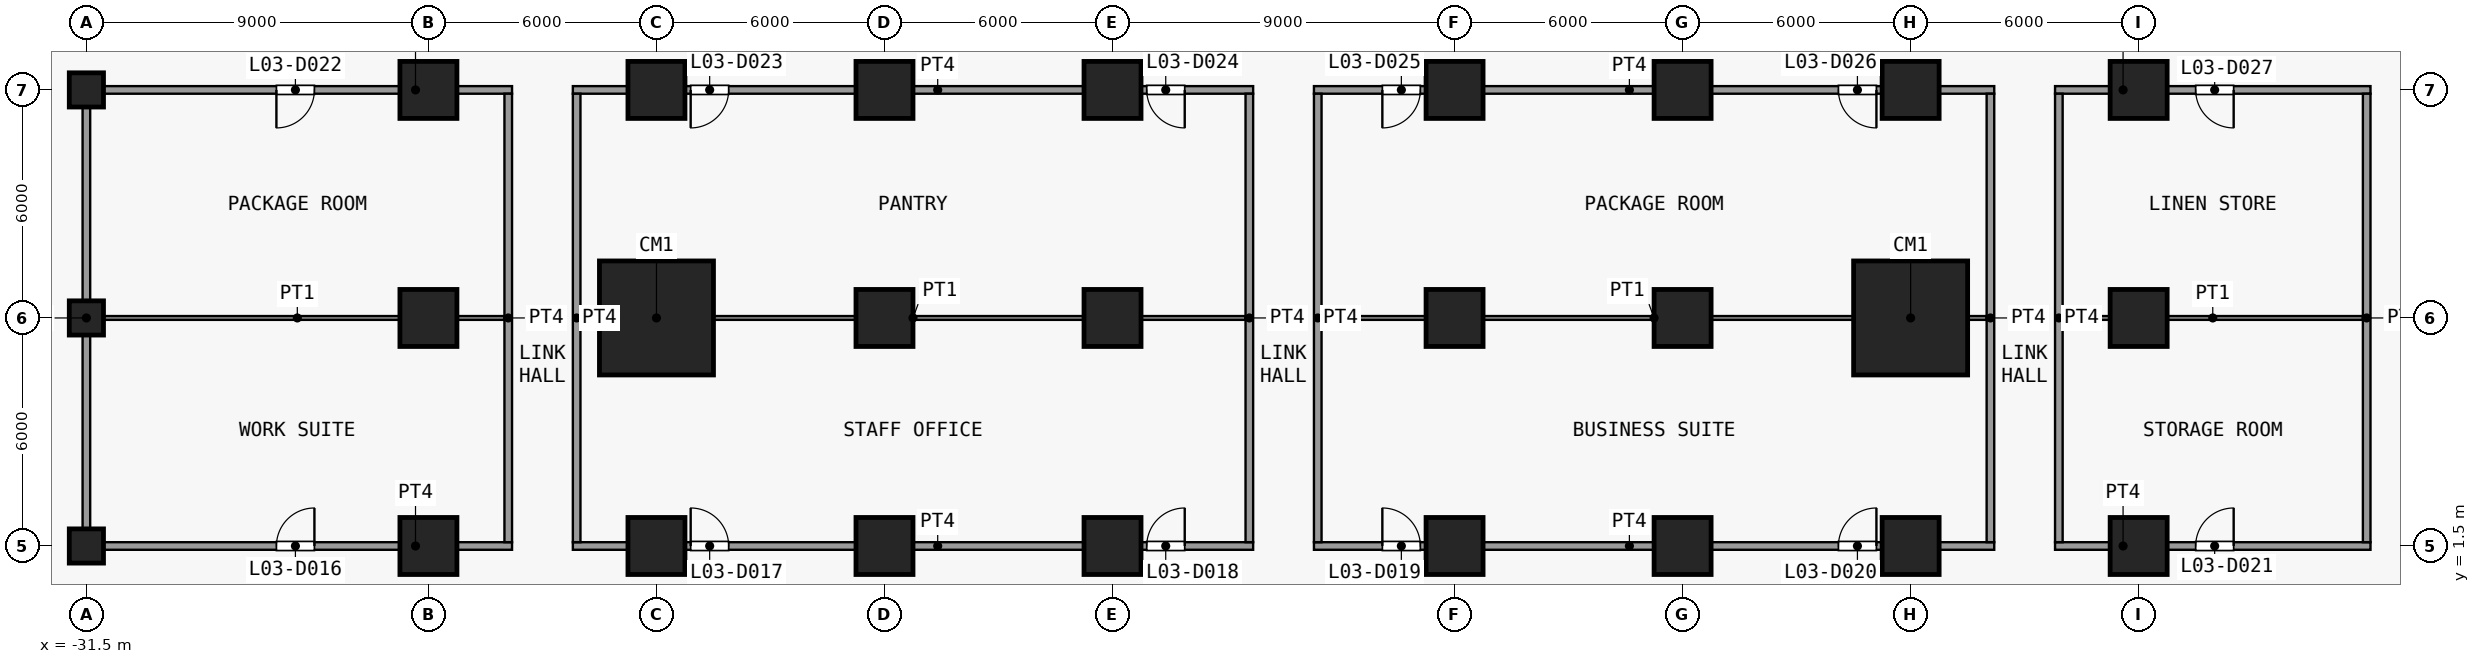
"""IFC4 building model, lengths in metres.
Left out: names, types, materials, properties, quantities, classifications, styles, units other than length and angle.
Written with IfcOpenShell. Run it as: python <this file> out.ifc"""

import sys

from ifc_helpers import new_model, si_unit, direction, frame, frame_2d, origin, origin_2d, place, context, subcontext, project, spatial, rectangle, extrude, element, fill, save


model = new_model("IFC4")
c1 = context("Model", 3, precision=1e-05, world=origin(), true_north=direction((0.0, 1.0)))
c2 = subcontext(c1, "Body", "Model", "MODEL_VIEW")
j1 = project(units=[si_unit("LENGTHUNIT", "METRE"), si_unit("PLANEANGLEUNIT", "RADIAN")], contexts=[c1])
p1 = place(None, origin())
s1 = spatial("IfcSite", under=j1, at=p1, CompositionType="ELEMENT")
p2 = place(p1, origin())
s2 = spatial("IfcBuilding", under=s1, at=p2, CompositionType="ELEMENT")
p3 = place(p2, frame((0.0, 0.0, 18.5)))
s3 = spatial("IfcBuildingStorey", under=s2, at=p3, CompositionType="ELEMENT", Elevation=18.5)
for number, where, z_axis, x_axis in (
    (1, (-31.5, 1.5, 0.0), (0.0, 0.0, 1.0), (1.0, 0.0, 0.0)),
    (2, (-31.5, 7.5, 0.0), (0.0, 0.0, 1.0), (1.0, 0.0, 0.0)),
    (3, (-31.5, 13.5, 0.0), (0.0, 0.0, 1.0), (1.0, 0.0, 0.0)),
):
    element("IfcColumn", number, at=place(p3, frame(where, z_axis=z_axis, x_axis=x_axis)), inside=s3, PredefinedType="COLUMN", context=c2, shape_type="SweptSolid", body=[
        extrude(rectangle(XDim=0.9, YDim=0.9, at=origin_2d()), origin(), (0.0, 0.0, 1.0), 5.0),
    ])
for number, where, z_axis, x_axis in (
    (4, (-22.5, 1.5, 0.0), (0.0, 0.0, 1.0), (1.0, 0.0, 0.0)),
    (5, (-22.5, 7.5, 0.0), (0.0, 0.0, 1.0), (1.0, 0.0, 0.0)),
    (6, (-22.5, 13.5, 0.0), (0.0, 0.0, 1.0), (1.0, 0.0, 0.0)),
    (7, (-16.5, 1.5, 0.0), (0.0, 0.0, 1.0), (1.0, 0.0, 0.0)),
):
    element("IfcColumn", number, at=place(p3, frame(where, z_axis=z_axis, x_axis=x_axis)), inside=s3, PredefinedType="COLUMN", context=c2, shape_type="SweptSolid", body=[
        extrude(rectangle(XDim=1.5, YDim=1.5, at=origin_2d()), origin(), (0.0, 0.0, 1.0), 5.0),
    ])
p4 = place(p3, frame((-16.5, 7.5, 0.0), z_axis=(0.0, 0.0, 1.0), x_axis=(1.0, 0.0, 0.0)))
e8 = element("IfcColumn", 8, at=p4, inside=s3, PredefinedType="COLUMN", context=c2, shape_type="SweptSolid", body=[
    extrude(rectangle(XDim=3.0, YDim=3.0, at=origin_2d()), origin(), (0.0, 0.0, 1.0), 5.0),
])
for number, where, z_axis, x_axis in (
    (9, (-16.5, 13.5, 0.0), (0.0, 0.0, 1.0), (1.0, 0.0, 0.0)),
    (10, (-10.5, 1.5, 0.0), (0.0, 0.0, 1.0), (1.0, 0.0, 0.0)),
    (11, (-10.5, 7.5, 0.0), (0.0, 0.0, 1.0), (1.0, 0.0, 0.0)),
    (12, (-10.5, 13.5, 0.0), (0.0, 0.0, 1.0), (1.0, 0.0, 0.0)),
    (13, (-4.5, 1.5, 0.0), (0.0, 0.0, 1.0), (1.0, 0.0, 0.0)),
    (14, (-4.5, 7.5, 0.0), (0.0, 0.0, 1.0), (1.0, 0.0, 0.0)),
    (15, (-4.5, 13.5, 0.0), (0.0, 0.0, 1.0), (1.0, 0.0, 0.0)),
    (16, (4.5, 1.5, 0.0), (0.0, 0.0, 1.0), (1.0, 0.0, 0.0)),
    (17, (4.5, 7.5, 0.0), (0.0, 0.0, 1.0), (1.0, 0.0, 0.0)),
    (18, (4.5, 13.5, 0.0), (0.0, 0.0, 1.0), (1.0, 0.0, 0.0)),
    (19, (10.5, 1.5, 0.0), (0.0, 0.0, 1.0), (1.0, 0.0, 0.0)),
    (20, (10.5, 7.5, 0.0), (0.0, 0.0, 1.0), (1.0, 0.0, 0.0)),
    (21, (10.5, 13.5, 0.0), (0.0, 0.0, 1.0), (1.0, 0.0, 0.0)),
    (22, (16.5, 1.5, 0.0), (0.0, 0.0, 1.0), (1.0, 0.0, 0.0)),
):
    element("IfcColumn", number, at=place(p3, frame(where, z_axis=z_axis, x_axis=x_axis)), inside=s3, PredefinedType="COLUMN", context=c2, shape_type="SweptSolid", body=[
        extrude(rectangle(XDim=1.5, YDim=1.5, at=origin_2d()), origin(), (0.0, 0.0, 1.0), 5.0),
    ])
p5 = place(p3, frame((16.5, 7.5, 0.0), z_axis=(0.0, 0.0, 1.0), x_axis=(1.0, 0.0, 0.0)))
e23 = element("IfcColumn", 23, at=p5, inside=s3, PredefinedType="COLUMN", context=c2, shape_type="SweptSolid", body=[
    extrude(rectangle(XDim=3.0, YDim=3.0, at=origin_2d()), origin(), (0.0, 0.0, 1.0), 5.0),
])
for number, where, z_axis, x_axis in (
    (24, (16.5, 13.5, 0.0), (0.0, 0.0, 1.0), (1.0, 0.0, 0.0)),
    (25, (22.5, 1.5, 0.0), (0.0, 0.0, 1.0), (1.0, 0.0, 0.0)),
    (26, (22.5, 7.5, 0.0), (0.0, 0.0, 1.0), (1.0, 0.0, 0.0)),
    (27, (22.5, 13.5, 0.0), (0.0, 0.0, 1.0), (1.0, 0.0, 0.0)),
):
    element("IfcColumn", number, at=place(p3, frame(where, z_axis=z_axis, x_axis=x_axis)), inside=s3, PredefinedType="COLUMN", context=c2, shape_type="SweptSolid", body=[
        extrude(rectangle(XDim=1.5, YDim=1.5, at=origin_2d()), origin(), (0.0, 0.0, 1.0), 5.0),
    ])
p6 = place(p3, frame((-31.6, 1.5, 0.0), z_axis=(0.0, 0.0, 1.0), x_axis=(1.0, 0.0, 0.0)))
e28 = element("IfcWall", 28, at=p6, inside=s3, PredefinedType="PARTITIONING", context=c2, shape_type="SweptSolid", body=[
    extrude(rectangle(XDim=11.3, YDim=0.2, at=frame_2d((5.65, 0.0))), origin(), (0.0, 0.0, 1.0), 4.65),
])
p7 = place(p6, frame((5.1, 0.0, 0.0)))
e29 = element("IfcOpeningElement", 29, at=p7, cuts=e28, PredefinedType="OPENING", context=c2, shape_type="SweptSolid", body=[
    extrude(rectangle(XDim=1.0, YDim=2.1, at=frame_2d((0.5, 1.05))), frame((0.0, 0.11, 0.0), z_axis=(0.0, -1.0, 0.0), x_axis=(1.0, 0.0, 0.0)), (0.0, 0.0, 1.0), 0.22),
])
p8 = place(p3, frame((-18.7, 1.5, 0.0), z_axis=(0.0, 0.0, 1.0), x_axis=(1.0, 0.0, 0.0)))
e30 = element("IfcWall", 30, at=p8, inside=s3, PredefinedType="PARTITIONING", context=c2, shape_type="SweptSolid", body=[
    extrude(rectangle(XDim=17.9, YDim=0.2, at=frame_2d((8.95, 0.0))), origin(), (0.0, 0.0, 1.0), 4.65),
])
p9 = place(p8, frame((3.1, 0.0, 0.0)))
e31 = element("IfcOpeningElement", 31, at=p9, cuts=e30, PredefinedType="OPENING", context=c2, shape_type="SweptSolid", body=[
    extrude(rectangle(XDim=1.0, YDim=2.1, at=frame_2d((0.5, 1.05))), frame((0.0, 0.11, 0.0), z_axis=(0.0, -1.0, 0.0), x_axis=(1.0, 0.0, 0.0)), (0.0, 0.0, 1.0), 0.22),
])
p10 = place(p8, frame((15.1, 0.0, 0.0)))
e32 = element("IfcOpeningElement", 32, at=p10, cuts=e30, PredefinedType="OPENING", context=c2, shape_type="SweptSolid", body=[
    extrude(rectangle(XDim=1.0, YDim=2.1, at=frame_2d((0.5, 1.05))), frame((0.0, 0.11, 0.0), z_axis=(0.0, -1.0, 0.0), x_axis=(1.0, 0.0, 0.0)), (0.0, 0.0, 1.0), 0.22),
])
p11 = place(p3, frame((0.8, 1.5, 0.0), z_axis=(0.0, 0.0, 1.0), x_axis=(1.0, 0.0, 0.0)))
e33 = element("IfcWall", 33, at=p11, inside=s3, PredefinedType="PARTITIONING", context=c2, shape_type="SweptSolid", body=[
    extrude(rectangle(XDim=17.9, YDim=0.2, at=frame_2d((8.95, 0.0))), origin(), (0.0, 0.0, 1.0), 4.65),
])
p12 = place(p11, frame((1.8, 0.0, 0.0)))
e34 = element("IfcOpeningElement", 34, at=p12, cuts=e33, PredefinedType="OPENING", context=c2, shape_type="SweptSolid", body=[
    extrude(rectangle(XDim=1.0, YDim=2.1, at=frame_2d((0.5, 1.05))), frame((0.0, 0.11, 0.0), z_axis=(0.0, -1.0, 0.0), x_axis=(1.0, 0.0, 0.0)), (0.0, 0.0, 1.0), 0.22),
])
p13 = place(p11, frame((13.8, 0.0, 0.0)))
e35 = element("IfcOpeningElement", 35, at=p13, cuts=e33, PredefinedType="OPENING", context=c2, shape_type="SweptSolid", body=[
    extrude(rectangle(XDim=1.0, YDim=2.1, at=frame_2d((0.5, 1.05))), frame((0.0, 0.11, 0.0), z_axis=(0.0, -1.0, 0.0), x_axis=(1.0, 0.0, 0.0)), (0.0, 0.0, 1.0), 0.22),
])
p14 = place(p3, frame((20.3, 1.5, 0.0), z_axis=(0.0, 0.0, 1.0), x_axis=(1.0, 0.0, 0.0)))
e36 = element("IfcWall", 36, at=p14, inside=s3, PredefinedType="PARTITIONING", context=c2, shape_type="SweptSolid", body=[
    extrude(rectangle(XDim=8.3, YDim=0.2, at=frame_2d((4.15, 0.0))), origin(), (0.0, 0.0, 1.0), 4.65),
])
p15 = place(p14, frame((3.7, 0.0, 0.0)))
e37 = element("IfcOpeningElement", 37, at=p15, cuts=e36, PredefinedType="OPENING", context=c2, shape_type="SweptSolid", body=[
    extrude(rectangle(XDim=1.0, YDim=2.1, at=frame_2d((0.5, 1.05))), frame((0.0, 0.11, 0.0), z_axis=(0.0, -1.0, 0.0), x_axis=(1.0, 0.0, 0.0)), (0.0, 0.0, 1.0), 0.22),
])
p16 = place(p3, frame((-31.4, 7.5, 0.0), z_axis=(0.0, 0.0, 1.0), x_axis=(1.0, 0.0, 0.0)))
e38 = element("IfcWall", 38, at=p16, inside=s3, PredefinedType="PARTITIONING", context=c2, shape_type="SweptSolid", body=[
    extrude(rectangle(XDim=10.9, YDim=0.1, at=frame_2d((5.45, 0.0))), origin(), (0.0, 0.0, 1.0), 4.65),
])
for number, where, z_axis, x_axis in (
    (39, (-18.5, 7.5, 0.0), (0.0, 0.0, 1.0), (1.0, 0.0, 0.0)),
    (40, (1.0, 7.5, 0.0), (0.0, 0.0, 1.0), (1.0, 0.0, 0.0)),
):
    element("IfcWall", number, at=place(p3, frame(where, z_axis=z_axis, x_axis=x_axis)), inside=s3, PredefinedType="PARTITIONING", context=c2, shape_type="SweptSolid", body=[
        extrude(rectangle(XDim=17.5, YDim=0.1, at=frame_2d((8.75, 0.0))), origin(), (0.0, 0.0, 1.0), 4.65),
    ])
p17 = place(p3, frame((20.5, 7.5, 0.0), z_axis=(0.0, 0.0, 1.0), x_axis=(1.0, 0.0, 0.0)))
e41 = element("IfcWall", 41, at=p17, inside=s3, PredefinedType="PARTITIONING", context=c2, shape_type="SweptSolid", body=[
    extrude(rectangle(XDim=7.9, YDim=0.1, at=frame_2d((3.95, 0.0))), origin(), (0.0, 0.0, 1.0), 4.65),
])
p18 = place(p3, frame((-31.6, 13.5, 0.0), z_axis=(0.0, 0.0, 1.0), x_axis=(1.0, 0.0, 0.0)))
e42 = element("IfcWall", 42, at=p18, inside=s3, PredefinedType="PARTITIONING", context=c2, shape_type="SweptSolid", body=[
    extrude(rectangle(XDim=11.3, YDim=0.2, at=frame_2d((5.65, 0.0))), origin(), (0.0, 0.0, 1.0), 4.65),
])
p19 = place(p18, frame((5.1, 0.0, 0.0)))
e43 = element("IfcOpeningElement", 43, at=p19, cuts=e42, PredefinedType="OPENING", context=c2, shape_type="SweptSolid", body=[
    extrude(rectangle(XDim=1.0, YDim=2.1, at=frame_2d((0.5, 1.05))), frame((0.0, 0.11, 0.0), z_axis=(0.0, -1.0, 0.0), x_axis=(1.0, 0.0, 0.0)), (0.0, 0.0, 1.0), 0.22),
])
p20 = place(p3, frame((-18.7, 13.5, 0.0), z_axis=(0.0, 0.0, 1.0), x_axis=(1.0, 0.0, 0.0)))
e44 = element("IfcWall", 44, at=p20, inside=s3, PredefinedType="PARTITIONING", context=c2, shape_type="SweptSolid", body=[
    extrude(rectangle(XDim=17.9, YDim=0.2, at=frame_2d((8.95, 0.0))), origin(), (0.0, 0.0, 1.0), 4.65),
])
p21 = place(p20, frame((3.1, 0.0, 0.0)))
e45 = element("IfcOpeningElement", 45, at=p21, cuts=e44, PredefinedType="OPENING", context=c2, shape_type="SweptSolid", body=[
    extrude(rectangle(XDim=1.0, YDim=2.1, at=frame_2d((0.5, 1.05))), frame((0.0, 0.11, 0.0), z_axis=(0.0, -1.0, 0.0), x_axis=(1.0, 0.0, 0.0)), (0.0, 0.0, 1.0), 0.22),
])
p22 = place(p20, frame((15.1, 0.0, 0.0)))
e46 = element("IfcOpeningElement", 46, at=p22, cuts=e44, PredefinedType="OPENING", context=c2, shape_type="SweptSolid", body=[
    extrude(rectangle(XDim=1.0, YDim=2.1, at=frame_2d((0.5, 1.05))), frame((0.0, 0.11, 0.0), z_axis=(0.0, -1.0, 0.0), x_axis=(1.0, 0.0, 0.0)), (0.0, 0.0, 1.0), 0.22),
])
p23 = place(p3, frame((0.8, 13.5, 0.0), z_axis=(0.0, 0.0, 1.0), x_axis=(1.0, 0.0, 0.0)))
e47 = element("IfcWall", 47, at=p23, inside=s3, PredefinedType="PARTITIONING", context=c2, shape_type="SweptSolid", body=[
    extrude(rectangle(XDim=17.9, YDim=0.2, at=frame_2d((8.95, 0.0))), origin(), (0.0, 0.0, 1.0), 4.65),
])
p24 = place(p23, frame((1.8, 0.0, 0.0)))
e48 = element("IfcOpeningElement", 48, at=p24, cuts=e47, PredefinedType="OPENING", context=c2, shape_type="SweptSolid", body=[
    extrude(rectangle(XDim=1.0, YDim=2.1, at=frame_2d((0.5, 1.05))), frame((0.0, 0.11, 0.0), z_axis=(0.0, -1.0, 0.0), x_axis=(1.0, 0.0, 0.0)), (0.0, 0.0, 1.0), 0.22),
])
p25 = place(p23, frame((13.8, 0.0, 0.0)))
e49 = element("IfcOpeningElement", 49, at=p25, cuts=e47, PredefinedType="OPENING", context=c2, shape_type="SweptSolid", body=[
    extrude(rectangle(XDim=1.0, YDim=2.1, at=frame_2d((0.5, 1.05))), frame((0.0, 0.11, 0.0), z_axis=(0.0, -1.0, 0.0), x_axis=(1.0, 0.0, 0.0)), (0.0, 0.0, 1.0), 0.22),
])
p26 = place(p3, frame((20.3, 13.5, 0.0), z_axis=(0.0, 0.0, 1.0), x_axis=(1.0, 0.0, 0.0)))
e50 = element("IfcWall", 50, at=p26, inside=s3, PredefinedType="PARTITIONING", context=c2, shape_type="SweptSolid", body=[
    extrude(rectangle(XDim=8.3, YDim=0.2, at=frame_2d((4.15, 0.0))), origin(), (0.0, 0.0, 1.0), 4.65),
])
p27 = place(p26, frame((3.7, 0.0, 0.0)))
e51 = element("IfcOpeningElement", 51, at=p27, cuts=e50, PredefinedType="OPENING", context=c2, shape_type="SweptSolid", body=[
    extrude(rectangle(XDim=1.0, YDim=2.1, at=frame_2d((0.5, 1.05))), frame((0.0, 0.11, 0.0), z_axis=(0.0, -1.0, 0.0), x_axis=(1.0, 0.0, 0.0)), (0.0, 0.0, 1.0), 0.22),
])
for number, where, z_axis, x_axis in (
    (52, (-31.5, 1.6, 0.0), (0.0, 0.0, 1.0), (0.0, 1.0, 0.0)),
    (53, (-20.4, 1.6, 0.0), (0.0, 0.0, 1.0), (0.0, 1.0, 0.0)),
    (54, (-18.6, 1.6, 0.0), (0.0, 0.0, 1.0), (0.0, 1.0, 0.0)),
    (55, (-0.9, 1.6, 0.0), (0.0, 0.0, 1.0), (0.0, 1.0, 0.0)),
    (56, (0.9, 1.6, 0.0), (0.0, 0.0, 1.0), (0.0, 1.0, 0.0)),
    (57, (18.6, 1.6, 0.0), (0.0, 0.0, 1.0), (0.0, 1.0, 0.0)),
    (58, (20.4, 1.6, 0.0), (0.0, 0.0, 1.0), (0.0, 1.0, 0.0)),
    (59, (28.5, 1.6, 0.0), (0.0, 0.0, 1.0), (0.0, 1.0, 0.0)),
):
    element("IfcWall", number, at=place(p3, frame(where, z_axis=z_axis, x_axis=x_axis)), inside=s3, PredefinedType="PARTITIONING", context=c2, shape_type="SweptSolid", body=[
        extrude(rectangle(XDim=11.8, YDim=0.2, at=frame_2d((5.9, 0.0))), origin(), (0.0, 0.0, 1.0), 4.65),
    ])
p28 = place(p7, origin())
e60 = element("IfcDoor", 60, at=p28, inside=s3, OperationType="SINGLE_SWING_LEFT", PredefinedType="DOOR", context=c2, shape_type="SweptSolid", body=[
    extrude(rectangle(XDim=1.0, YDim=2.1, at=frame_2d((0.5, 1.05))), frame((0.0, 0.025, 0.0), z_axis=(0.0, -1.0, 0.0), x_axis=(1.0, 0.0, 0.0)), (0.0, 0.0, 1.0), 0.05),
])
fill(e29, e60)
p29 = place(p9, origin())
e61 = element("IfcDoor", 61, at=p29, inside=s3, OperationType="SINGLE_SWING_RIGHT", PredefinedType="DOOR", context=c2, shape_type="SweptSolid", body=[
    extrude(rectangle(XDim=1.0, YDim=2.1, at=frame_2d((0.5, 1.05))), frame((0.0, 0.025, 0.0), z_axis=(0.0, -1.0, 0.0), x_axis=(1.0, 0.0, 0.0)), (0.0, 0.0, 1.0), 0.05),
])
fill(e31, e61)
p30 = place(p10, origin())
e62 = element("IfcDoor", 62, at=p30, inside=s3, OperationType="SINGLE_SWING_LEFT", PredefinedType="DOOR", context=c2, shape_type="SweptSolid", body=[
    extrude(rectangle(XDim=1.0, YDim=2.1, at=frame_2d((0.5, 1.05))), frame((0.0, 0.025, 0.0), z_axis=(0.0, -1.0, 0.0), x_axis=(1.0, 0.0, 0.0)), (0.0, 0.0, 1.0), 0.05),
])
fill(e32, e62)
p31 = place(p12, origin())
e63 = element("IfcDoor", 63, at=p31, inside=s3, OperationType="SINGLE_SWING_RIGHT", PredefinedType="DOOR", context=c2, shape_type="SweptSolid", body=[
    extrude(rectangle(XDim=1.0, YDim=2.1, at=frame_2d((0.5, 1.05))), frame((0.0, 0.025, 0.0), z_axis=(0.0, -1.0, 0.0), x_axis=(1.0, 0.0, 0.0)), (0.0, 0.0, 1.0), 0.05),
])
fill(e34, e63)
p32 = place(p13, origin())
e64 = element("IfcDoor", 64, at=p32, inside=s3, OperationType="SINGLE_SWING_LEFT", PredefinedType="DOOR", context=c2, shape_type="SweptSolid", body=[
    extrude(rectangle(XDim=1.0, YDim=2.1, at=frame_2d((0.5, 1.05))), frame((0.0, 0.025, 0.0), z_axis=(0.0, -1.0, 0.0), x_axis=(1.0, 0.0, 0.0)), (0.0, 0.0, 1.0), 0.05),
])
fill(e35, e64)
p33 = place(p15, origin())
e65 = element("IfcDoor", 65, at=p33, inside=s3, OperationType="SINGLE_SWING_LEFT", PredefinedType="DOOR", context=c2, shape_type="SweptSolid", body=[
    extrude(rectangle(XDim=1.0, YDim=2.1, at=frame_2d((0.5, 1.05))), frame((0.0, 0.025, 0.0), z_axis=(0.0, -1.0, 0.0), x_axis=(1.0, 0.0, 0.0)), (0.0, 0.0, 1.0), 0.05),
])
fill(e37, e65)
p34 = place(p19, origin())
e66 = element("IfcDoor", 66, at=p34, inside=s3, OperationType="SINGLE_SWING_LEFT", PredefinedType="DOOR", context=c2, shape_type="SweptSolid", body=[
    extrude(rectangle(XDim=1.0, YDim=2.1, at=frame_2d((0.5, 1.05))), frame((0.0, 0.025, 0.0), z_axis=(0.0, -1.0, 0.0), x_axis=(1.0, 0.0, 0.0)), (0.0, 0.0, 1.0), 0.05),
])
fill(e43, e66)
p35 = place(p21, origin())
e67 = element("IfcDoor", 67, at=p35, inside=s3, OperationType="SINGLE_SWING_LEFT", PredefinedType="DOOR", context=c2, shape_type="SweptSolid", body=[
    extrude(rectangle(XDim=1.0, YDim=2.1, at=frame_2d((0.5, 1.05))), frame((0.0, 0.025, 0.0), z_axis=(0.0, -1.0, 0.0), x_axis=(1.0, 0.0, 0.0)), (0.0, 0.0, 1.0), 0.05),
])
fill(e45, e67)
p36 = place(p22, origin())
e68 = element("IfcDoor", 68, at=p36, inside=s3, OperationType="SINGLE_SWING_RIGHT", PredefinedType="DOOR", context=c2, shape_type="SweptSolid", body=[
    extrude(rectangle(XDim=1.0, YDim=2.1, at=frame_2d((0.5, 1.05))), frame((0.0, 0.025, 0.0), z_axis=(0.0, -1.0, 0.0), x_axis=(1.0, 0.0, 0.0)), (0.0, 0.0, 1.0), 0.05),
])
fill(e46, e68)
p37 = place(p24, origin())
e69 = element("IfcDoor", 69, at=p37, inside=s3, OperationType="SINGLE_SWING_LEFT", PredefinedType="DOOR", context=c2, shape_type="SweptSolid", body=[
    extrude(rectangle(XDim=1.0, YDim=2.1, at=frame_2d((0.5, 1.05))), frame((0.0, 0.025, 0.0), z_axis=(0.0, -1.0, 0.0), x_axis=(1.0, 0.0, 0.0)), (0.0, 0.0, 1.0), 0.05),
])
fill(e48, e69)
p38 = place(p25, origin())
e70 = element("IfcDoor", 70, at=p38, inside=s3, OperationType="SINGLE_SWING_RIGHT", PredefinedType="DOOR", context=c2, shape_type="SweptSolid", body=[
    extrude(rectangle(XDim=1.0, YDim=2.1, at=frame_2d((0.5, 1.05))), frame((0.0, 0.025, 0.0), z_axis=(0.0, -1.0, 0.0), x_axis=(1.0, 0.0, 0.0)), (0.0, 0.0, 1.0), 0.05),
])
fill(e49, e70)
p39 = place(p27, origin())
e71 = element("IfcDoor", 71, at=p39, inside=s3, OperationType="SINGLE_SWING_RIGHT", PredefinedType="DOOR", context=c2, shape_type="SweptSolid", body=[
    extrude(rectangle(XDim=1.0, YDim=2.1, at=frame_2d((0.5, 1.05))), frame((0.0, 0.025, 0.0), z_axis=(0.0, -1.0, 0.0), x_axis=(1.0, 0.0, 0.0)), (0.0, 0.0, 1.0), 0.05),
])
fill(e51, e71)
save(model, sys.argv[1])
